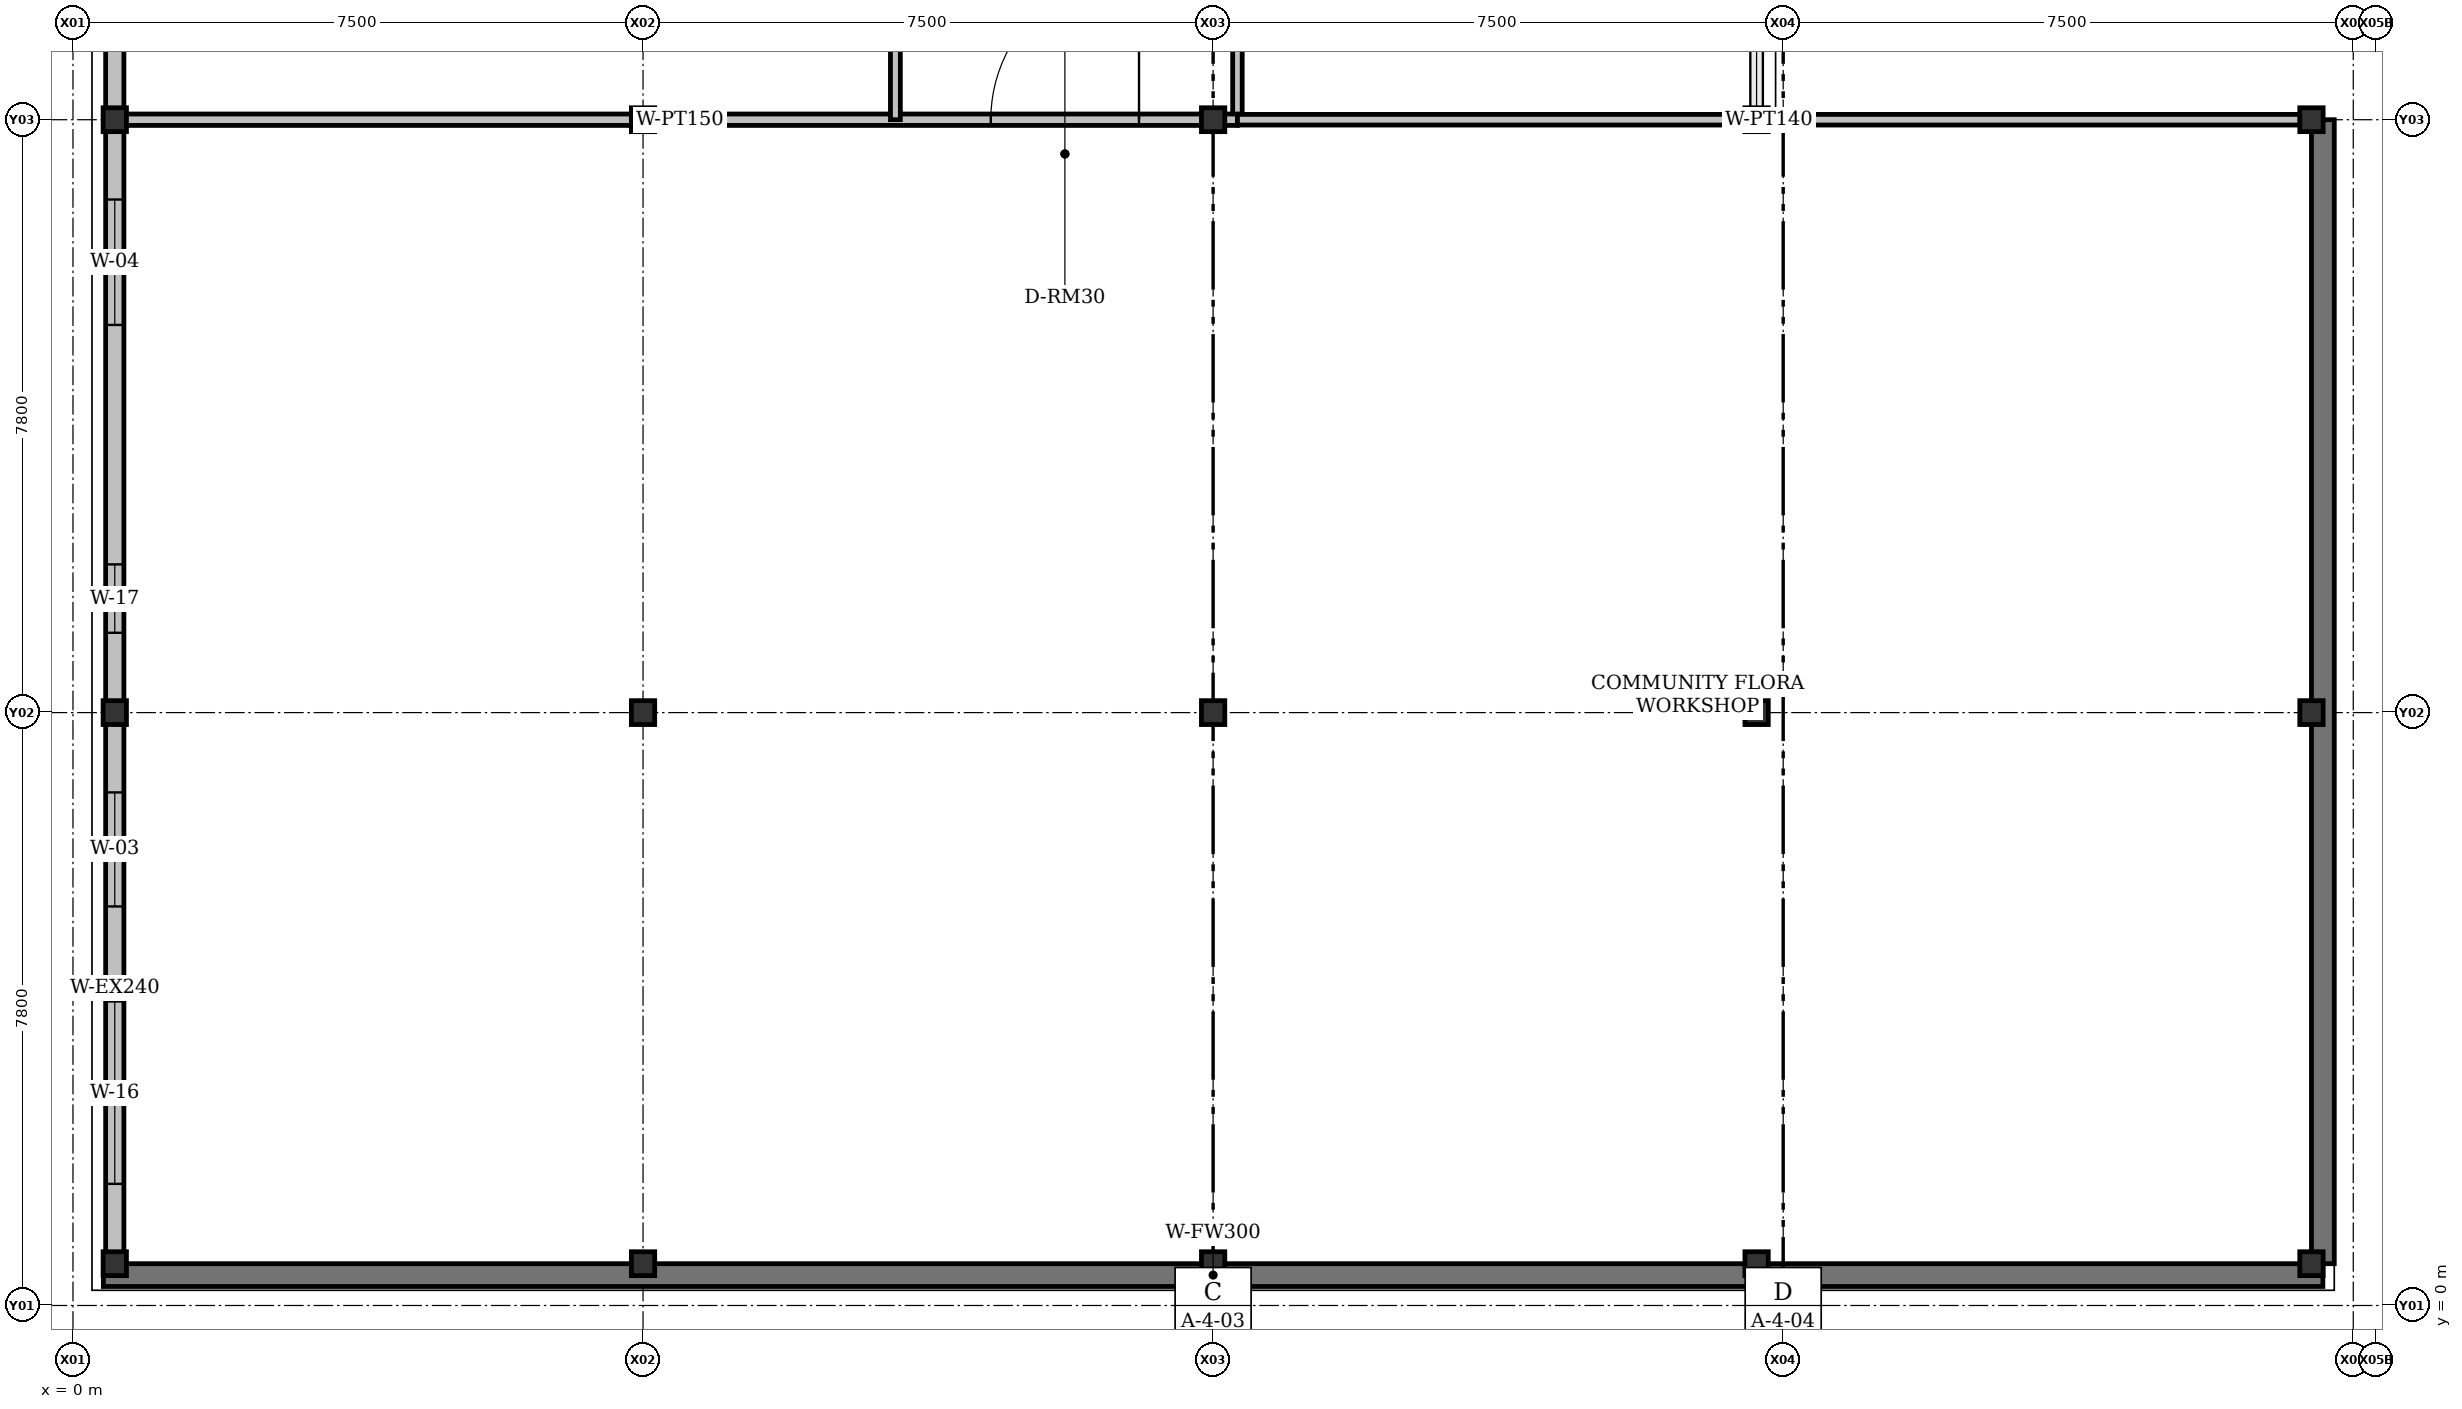
"""IFC4 building model, lengths in metres.
Left out: names, types, materials, properties, quantities, classifications, styles, units other than length and angle.
Written with IfcOpenShell. Run it as: python <this file> out.ifc"""

import sys

from ifc_helpers import new_model, si_unit, direction, frame, frame_2d, origin, origin_2d, place, context, subcontext, project, spatial, rectangle, i_section, extrude, element, fill, save


model = new_model("IFC4")
c1 = context("Model", 3, precision=1e-05, world=origin(), true_north=direction((0.0, 1.0)))
c2 = subcontext(c1, "Body", "Model", "MODEL_VIEW")
j1 = project(units=[si_unit("LENGTHUNIT", "METRE"), si_unit("PLANEANGLEUNIT", "RADIAN")], contexts=[c1])
p1 = place(None, origin())
s1 = spatial("IfcSite", under=j1, at=p1, CompositionType="ELEMENT")
p2 = place(p1, origin())
s2 = spatial("IfcBuilding", under=s1, at=p2, CompositionType="ELEMENT")
p3 = place(p2, frame((0.0, 0.0, 14.1)))
s3 = spatial("IfcBuildingStorey", under=s2, at=p3, CompositionType="ELEMENT", Elevation=14.1)
for number, where, z_axis, x_axis in (
    (1, (0.55, 0.55, 0.0), (0.0, 0.0, 1.0), (1.0, 0.0, 0.0)),
    (2, (0.55, 7.8, 0.0), (0.0, 0.0, 1.0), (1.0, 0.0, 0.0)),
    (3, (0.55, 15.6, 0.0), (0.0, 0.0, 1.0), (1.0, 0.0, 0.0)),
    (4, (7.5, 0.55, 0.0), (0.0, 0.0, 1.0), (1.0, 0.0, 0.0)),
    (5, (7.5, 7.8, 0.0), (0.0, 0.0, 1.0), (1.0, 0.0, 0.0)),
    (6, (7.5, 15.6, 0.0), (0.0, 0.0, 1.0), (1.0, 0.0, 0.0)),
    (7, (15.0, 0.55, 0.0), (0.0, 0.0, 1.0), (1.0, 0.0, 0.0)),
    (8, (15.0, 7.8, 0.0), (0.0, 0.0, 1.0), (1.0, 0.0, 0.0)),
    (9, (15.0, 15.6, 0.0), (0.0, 0.0, 1.0), (1.0, 0.0, 0.0)),
    (10, (22.15, 0.55, 0.0), (0.0, 0.0, 1.0), (1.0, 0.0, 0.0)),
    (11, (22.15, 7.8, 0.0), (0.0, 0.0, 1.0), (1.0, 0.0, 0.0)),
    (12, (22.15, 15.6, 0.0), (0.0, 0.0, 1.0), (1.0, 0.0, 0.0)),
    (13, (29.45, 0.55, 0.0), (0.0, 0.0, 1.0), (1.0, 0.0, 0.0)),
    (14, (29.45, 7.8, 0.0), (0.0, 0.0, 1.0), (1.0, 0.0, 0.0)),
    (15, (29.45, 15.6, 0.0), (0.0, 0.0, 1.0), (1.0, 0.0, 0.0)),
):
    element("IfcColumn", number, at=place(p3, frame(where, z_axis=z_axis, x_axis=x_axis)), inside=s3, PredefinedType="COLUMN", context=c2, shape_type="SweptSolid", body=[
        extrude(i_section(OverallWidth=0.307, OverallDepth=0.314, WebThickness=0.012, FlangeThickness=0.019, FilletRadius=0.015, at=origin_2d()), origin(), (0.0, 0.0, 1.0), 4.2),
    ])
p4 = place(p3, frame((29.6, 0.4, 0.0), z_axis=(0.0, 0.0, 1.0), x_axis=(-1.0, 0.0, 0.0)))
e16 = element("IfcWall", 16, at=p4, inside=s3, PredefinedType="SOLIDWALL", context=c2, shape_type="SweptSolid", body=[
    extrude(rectangle(XDim=29.2, YDim=0.3, at=frame_2d((14.6, 0.0))), origin(), (0.0, 0.0, 1.0), 3.975),
])
p5 = place(p3, frame((29.6, 15.6, 0.0), z_axis=(0.0, 0.0, 1.0), x_axis=(0.0, -1.0, 0.0)))
e17 = element("IfcWall", 17, at=p5, inside=s3, PredefinedType="SOLIDWALL", context=c2, shape_type="SweptSolid", body=[
    extrude(rectangle(XDim=15.05, YDim=0.3, at=frame_2d((7.525, 0.0))), origin(), (0.0, 0.0, 1.0), 3.975),
])
p6 = place(p3, frame((0.55, 0.55, 0.0), z_axis=(0.0, 0.0, 1.0), x_axis=(0.0, 1.0, 0.0)))
e18 = element("IfcWall", 18, at=p6, inside=s3, PredefinedType="SOLIDWALL", context=c2, shape_type="SweptSolid", body=[
    extrude(rectangle(XDim=7.25, YDim=0.24, at=frame_2d((3.625, 0.0))), origin(), (0.0, 0.0, 1.0), 3.502),
])
p7 = place(p6, frame((1.05, 0.0, 0.92)))
e19 = element("IfcOpeningElement", 19, at=p7, cuts=e18, PredefinedType="OPENING", context=c2, shape_type="SweptSolid", body=[
    extrude(rectangle(XDim=2.4, YDim=1.7, at=frame_2d((1.2, 0.85))), frame((0.0, 0.12, 0.0), z_axis=(0.0, -1.0, 0.0), x_axis=(1.0, 0.0, 0.0)), (0.0, 0.0, 1.0), 0.24),
])
p8 = place(p6, frame((4.7, 0.0, 0.92)))
e20 = element("IfcOpeningElement", 20, at=p8, cuts=e18, PredefinedType="OPENING", context=c2, shape_type="SweptSolid", body=[
    extrude(rectangle(XDim=1.5, YDim=1.4, at=frame_2d((0.75, 0.7))), frame((0.0, 0.12, 0.0), z_axis=(0.0, -1.0, 0.0), x_axis=(1.0, 0.0, 0.0)), (0.0, 0.0, 1.0), 0.24),
])
p9 = place(p3, frame((0.55, 7.8, 0.0), z_axis=(0.0, 0.0, 1.0), x_axis=(0.0, 1.0, 0.0)))
e21 = element("IfcWall", 21, at=p9, inside=s3, PredefinedType="SOLIDWALL", context=c2, shape_type="SweptSolid", body=[
    extrude(rectangle(XDim=7.8, YDim=0.24, at=frame_2d((3.9, 0.0))), origin(), (0.0, 0.0, 1.0), 3.502),
])
p10 = place(p9, frame((1.05, 0.0, 0.92)))
e22 = element("IfcOpeningElement", 22, at=p10, cuts=e21, PredefinedType="OPENING", context=c2, shape_type="SweptSolid", body=[
    extrude(rectangle(XDim=0.9, YDim=1.3, at=frame_2d((0.45, 0.65))), frame((0.0, 0.12, 0.0), z_axis=(0.0, -1.0, 0.0), x_axis=(1.0, 0.0, 0.0)), (0.0, 0.0, 1.0), 0.24),
])
p11 = place(p9, frame((5.1, 0.0, 0.92)))
e23 = element("IfcOpeningElement", 23, at=p11, cuts=e21, PredefinedType="OPENING", context=c2, shape_type="SweptSolid", body=[
    extrude(rectangle(XDim=1.65, YDim=1.4, at=frame_2d((0.825, 0.7))), frame((0.0, 0.12, 0.0), z_axis=(0.0, -1.0, 0.0), x_axis=(1.0, 0.0, 0.0)), (0.0, 0.0, 1.0), 0.24),
])
p12 = place(p3, frame((0.55, 15.6, 0.0), z_axis=(0.0, 0.0, 1.0), x_axis=(0.0, 1.0, 0.0)))
e24 = element("IfcWall", 24, at=p12, inside=s3, PredefinedType="SOLIDWALL", context=c2, shape_type="SweptSolid", body=[
    extrude(rectangle(XDim=7.8, YDim=0.24, at=frame_2d((3.9, 0.0))), origin(), (0.0, 0.0, 1.0), 3.502),
])
p13 = place(p12, frame((1.05, 0.0, 0.92)))
e25 = element("IfcOpeningElement", 25, at=p13, cuts=e24, PredefinedType="OPENING", context=c2, shape_type="SweptSolid", body=[
    extrude(rectangle(XDim=1.05, YDim=1.3, at=frame_2d((0.525, 0.65))), frame((0.0, 0.12, 0.0), z_axis=(0.0, -1.0, 0.0), x_axis=(1.0, 0.0, 0.0)), (0.0, 0.0, 1.0), 0.24),
])
p14 = place(p12, frame((4.95, 0.0, 0.92)))
e26 = element("IfcOpeningElement", 26, at=p14, cuts=e24, PredefinedType="OPENING", context=c2, shape_type="SweptSolid", body=[
    extrude(rectangle(XDim=1.8, YDim=1.4, at=frame_2d((0.9, 0.7))), frame((0.0, 0.12, 0.0), z_axis=(0.0, -1.0, 0.0), x_axis=(1.0, 0.0, 0.0)), (0.0, 0.0, 1.0), 0.24),
])
p15 = place(p3, frame((15.32, 15.6, 0.0), z_axis=(0.0, 0.0, 1.0), x_axis=(0.0, 1.0, 0.0)))
e27 = element("IfcWall", 27, at=p15, inside=s3, PredefinedType="PARTITIONING", context=c2, shape_type="SweptSolid", body=[
    extrude(rectangle(XDim=1.78, YDim=0.125, at=frame_2d((0.89, 0.0))), origin(), (0.0, 0.0, 1.0), 3.426),
])
p16 = place(p3, frame((0.65, 15.6, 0.0), z_axis=(0.0, 0.0, 1.0), x_axis=(1.0, 0.0, 0.0)))
e28 = element("IfcWall", 28, at=p16, inside=s3, PredefinedType="PARTITIONING", context=c2, shape_type="SweptSolid", body=[
    extrude(rectangle(XDim=14.67, YDim=0.15, at=frame_2d((7.335, 0.0))), origin(), (0.0, 0.0, 1.0), 3.426),
])
p17 = place(p16, frame((11.425, 0.0, 0.0)))
e29 = element("IfcOpeningElement", 29, at=p17, cuts=e28, PredefinedType="OPENING", context=c2, shape_type="SweptSolid", body=[
    extrude(rectangle(XDim=1.95, YDim=2.4, at=frame_2d((0.975, 1.2))), frame((0.0, 0.075, 0.0), z_axis=(0.0, -1.0, 0.0), x_axis=(1.0, 0.0, 0.0)), (0.0, 0.0, 1.0), 0.15),
])
p18 = place(p3, frame((29.302, 15.6, 0.0), z_axis=(0.0, 0.0, 1.0), x_axis=(-1.0, 0.0, 0.0)))
e30 = element("IfcWall", 30, at=p18, inside=s3, PredefinedType="PARTITIONING", context=c2, shape_type="SweptSolid", body=[
    extrude(rectangle(XDim=13.981, YDim=0.14, at=frame_2d((6.991, 0.0))), origin(), (0.0, 0.0, 1.0), 3.426),
])
p19 = place(p3, frame((10.82, 15.6, 0.0), z_axis=(0.0, 0.0, 1.0), x_axis=(0.0, 1.0, 0.0)))
e31 = element("IfcWall", 31, at=p19, inside=s3, PredefinedType="PARTITIONING", context=c2, shape_type="SweptSolid", body=[
    extrude(rectangle(XDim=38.55, YDim=0.13, at=frame_2d((19.275, 0.0))), origin(), (0.0, 0.0, 1.0), 3.426),
])
p20 = place(p19, frame((18.55, 0.0, 0.0)))
e32 = element("IfcOpeningElement", 32, at=p20, cuts=e31, PredefinedType="OPENING", context=c2, shape_type="SweptSolid", body=[
    extrude(rectangle(XDim=0.9, YDim=2.08, at=frame_2d((0.45, 1.04))), frame((0.0, 0.065, 0.0), z_axis=(0.0, -1.0, 0.0), x_axis=(1.0, 0.0, 0.0)), (0.0, 0.0, 1.0), 0.13),
])
p21 = place(p19, frame((20.3, 0.0, 0.92)))
e33 = element("IfcOpeningElement", 33, at=p21, cuts=e31, PredefinedType="OPENING", context=c2, shape_type="SweptSolid", body=[
    extrude(rectangle(XDim=1.05, YDim=1.2, at=frame_2d((0.525, 0.6))), frame((0.0, 0.065, 0.0), z_axis=(0.0, -1.0, 0.0), x_axis=(1.0, 0.0, 0.0)), (0.0, 0.0, 1.0), 0.13),
])
p22 = place(p7, origin())
e34 = element("IfcWindow", 34, at=p22, inside=s3, PartitioningType="DOUBLE_PANEL_VERTICAL", PredefinedType="WINDOW", context=c2, shape_type="SweptSolid", body=[
    extrude(rectangle(XDim=2.4, YDim=1.7, at=frame_2d((1.2, 0.85))), frame((0.0, 0.03, 0.0), z_axis=(0.0, -1.0, 0.0), x_axis=(1.0, 0.0, 0.0)), (0.0, 0.0, 1.0), 0.06),
])
fill(e19, e34)
p23 = place(p8, origin())
e35 = element("IfcWindow", 35, at=p23, inside=s3, PartitioningType="SINGLE_PANEL", PredefinedType="WINDOW", context=c2, shape_type="SweptSolid", body=[
    extrude(rectangle(XDim=1.5, YDim=1.4, at=frame_2d((0.75, 0.7))), frame((0.0, 0.03, 0.0), z_axis=(0.0, -1.0, 0.0), x_axis=(1.0, 0.0, 0.0)), (0.0, 0.0, 1.0), 0.06),
])
fill(e20, e35)
p24 = place(p10, origin())
e36 = element("IfcWindow", 36, at=p24, inside=s3, PartitioningType="SINGLE_PANEL", PredefinedType="WINDOW", context=c2, shape_type="SweptSolid", body=[
    extrude(rectangle(XDim=0.9, YDim=1.3, at=frame_2d((0.45, 0.65))), frame((0.0, 0.03, 0.0), z_axis=(0.0, -1.0, 0.0), x_axis=(1.0, 0.0, 0.0)), (0.0, 0.0, 1.0), 0.06),
])
fill(e22, e36)
p25 = place(p11, origin())
e37 = element("IfcWindow", 37, at=p25, inside=s3, PartitioningType="DOUBLE_PANEL_VERTICAL", PredefinedType="WINDOW", context=c2, shape_type="SweptSolid", body=[
    extrude(rectangle(XDim=1.65, YDim=1.4, at=frame_2d((0.825, 0.7))), frame((0.0, 0.03, 0.0), z_axis=(0.0, -1.0, 0.0), x_axis=(1.0, 0.0, 0.0)), (0.0, 0.0, 1.0), 0.06),
])
fill(e23, e37)
p26 = place(p17, origin())
e38 = element("IfcDoor", 38, at=p26, inside=s3, OperationType="SINGLE_SWING_RIGHT", PredefinedType="DOOR", context=c2, shape_type="SweptSolid", body=[
    extrude(rectangle(XDim=1.95, YDim=2.4, at=frame_2d((0.975, 1.2))), frame((0.0, 0.025, 0.0), z_axis=(0.0, -1.0, 0.0), x_axis=(1.0, 0.0, 0.0)), (0.0, 0.0, 1.0), 0.05),
])
fill(e29, e38)
save(model, sys.argv[1])
